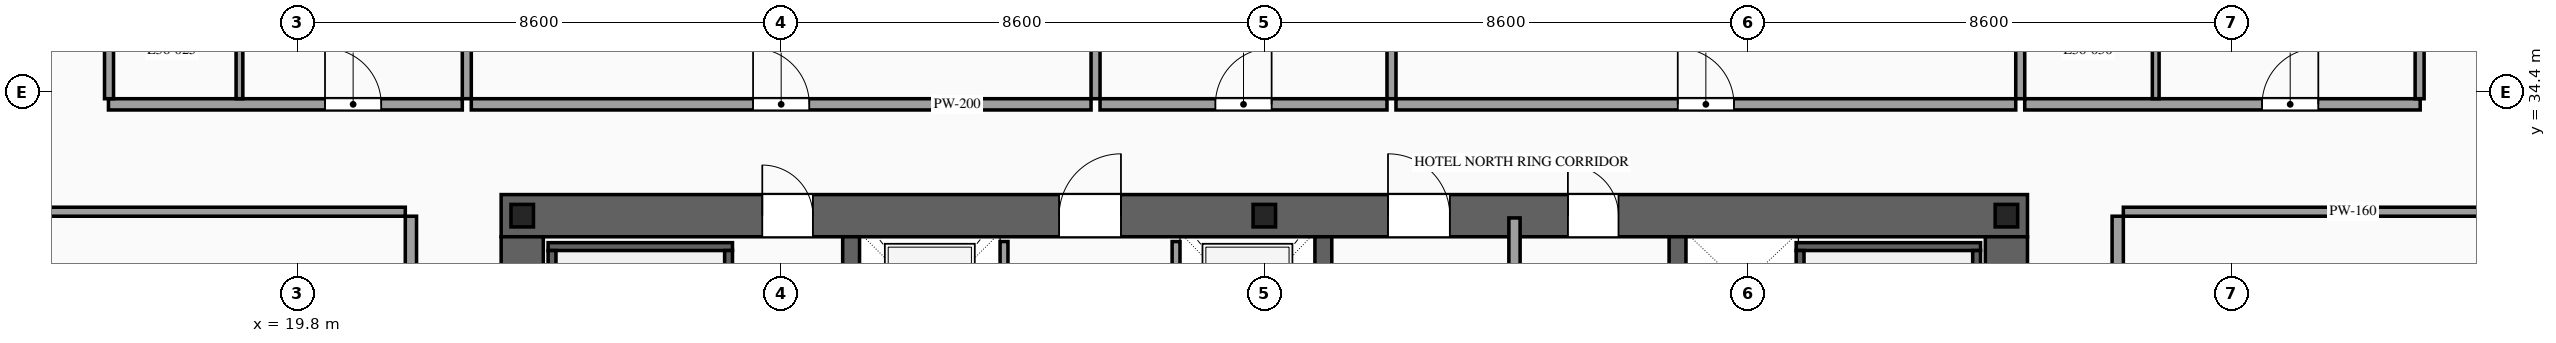
"""IFC4 building model, lengths in metres.
Left out: names, types, materials, properties, quantities, classifications, styles, units other than length and angle.
Written with IfcOpenShell. Run it as: python <this file> out.ifc"""

import sys

from ifc_helpers import new_model, si_unit, direction, frame, frame_2d, origin, origin_2d, place, context, subcontext, project, spatial, rectangle, i_section, extrude, source, transform, mapped, element, fill, save


model = new_model("IFC4")
c1 = context("Model", 3, precision=1e-05, world=origin(), true_north=direction((0.0, 1.0)))
c2 = subcontext(c1, "Body", "Model", "MODEL_VIEW")
j1 = project(units=[si_unit("LENGTHUNIT", "METRE"), si_unit("PLANEANGLEUNIT", "RADIAN")], contexts=[c1])
p1 = place(None, origin())
s1 = spatial("IfcSite", under=j1, at=p1, CompositionType="ELEMENT")
p2 = place(p1, origin())
s2 = spatial("IfcBuilding", under=s1, at=p2, CompositionType="ELEMENT")
p3 = place(p2, frame((0.0, 0.0, 138.0)))
s3 = spatial("IfcBuildingStorey", under=s2, at=p3, CompositionType="ELEMENT", Elevation=138.0)
p4 = place(p3, frame((23.425, 32.2, 0.0), z_axis=(0.0, 0.0, 1.0), x_axis=(1.0, 0.0, 0.0)))
e1 = element("IfcWall", 1, at=p4, inside=s3, PredefinedType="SHEAR", context=c2, shape_type="SweptSolid", body=[
    extrude(rectangle(XDim=27.15, YDim=0.75, at=frame_2d((13.575, 0.0))), origin(), (0.0, 0.0, 1.0), 3.6),
])
p5 = place(p4, frame((4.645, 0.0, 0.0)))
e2 = element("IfcOpeningElement", 2, at=p5, cuts=e1, PredefinedType="OPENING", context=c2, shape_type="SweptSolid", body=[
    extrude(rectangle(XDim=0.9, YDim=2.15, at=frame_2d((0.45, 1.075))), frame((0.0, 0.39, 0.0), z_axis=(0.0, -1.0, 0.0), x_axis=(1.0, 0.0, 0.0)), (0.0, 0.0, 1.0), 0.78),
])
p6 = place(p4, frame((9.925, 0.0, 0.0)))
e3 = element("IfcOpeningElement", 3, at=p6, cuts=e1, PredefinedType="OPENING", context=c2, shape_type="SweptSolid", body=[
    extrude(rectangle(XDim=1.1, YDim=2.2, at=frame_2d((0.55, 1.1))), frame((0.0, 0.39, 0.0), z_axis=(0.0, -1.0, 0.0), x_axis=(1.0, 0.0, 0.0)), (0.0, 0.0, 1.0), 0.78),
])
p7 = place(p4, frame((15.775, 0.0, 0.0)))
e4 = element("IfcOpeningElement", 4, at=p7, cuts=e1, PredefinedType="OPENING", context=c2, shape_type="SweptSolid", body=[
    extrude(rectangle(XDim=1.1, YDim=2.2, at=frame_2d((0.55, 1.1))), frame((0.0, 0.39, 0.0), z_axis=(0.0, -1.0, 0.0), x_axis=(1.0, 0.0, 0.0)), (0.0, 0.0, 1.0), 0.78),
])
p8 = place(p4, frame((18.975, 0.0, 0.0)))
e5 = element("IfcOpeningElement", 5, at=p8, cuts=e1, PredefinedType="OPENING", context=c2, shape_type="SweptSolid", body=[
    extrude(rectangle(XDim=0.9, YDim=2.15, at=frame_2d((0.45, 1.075))), frame((0.0, 0.39, 0.0), z_axis=(0.0, -1.0, 0.0), x_axis=(1.0, 0.0, 0.0)), (0.0, 0.0, 1.0), 0.78),
])
m1 = source(origin(), c2, "Body", "SweptSolid", [
    extrude(rectangle(XDim=12.05, YDim=0.75, at=frame_2d((6.025, 0.0))), origin(), (0.0, 0.0, 1.0), 3.6),
])
for number, where, z_axis, x_axis in (
    (6, (23.8, 19.775, 0.0), (0.0, 0.0, 1.0), (0.0, 1.0, 0.0)),
    (7, (50.2, 19.775, 0.0), (0.0, 0.0, 1.0), (0.0, 1.0, 0.0)),
):
    element("IfcWall", number, at=place(p3, frame(where, z_axis=z_axis, x_axis=x_axis)), inside=s3, PredefinedType="SHEAR", context=c2, shape_type="MappedRepresentation", body=[
        mapped(m1, transform((0.0, 0.0, 0.0), scale=1.0)),
    ])
m2 = source(origin(), c2, "Body", "SweptSolid", [
    extrude(rectangle(XDim=12.05, YDim=0.3, at=frame_2d((6.025, 0.0))), origin(), (0.0, 0.0, 1.0), 3.6),
])
for number, where, z_axis, x_axis in (
    (8, (29.65, 19.775, 0.0), (0.0, 0.0, 1.0), (0.0, 1.0, 0.0)),
    (9, (38.05, 19.775, 0.0), (0.0, 0.0, 1.0), (0.0, 1.0, 0.0)),
    (10, (44.35, 19.775, 0.0), (0.0, 0.0, 1.0), (0.0, 1.0, 0.0)),
):
    element("IfcWall", number, at=place(p3, frame(where, z_axis=z_axis, x_axis=x_axis)), inside=s3, PredefinedType="SOLIDWALL", context=c2, shape_type="MappedRepresentation", body=[
        mapped(m2, transform((0.0, 0.0, 0.0), scale=1.0)),
    ])
m3 = source(origin(), c2, "Body", "SweptSolid", [
    extrude(i_section(OverallWidth=0.4, OverallDepth=0.4, WebThickness=0.013, FlangeThickness=0.021, at=origin_2d()), origin(), (0.0, 0.0, 1.0), 3.6),
])
for number, where, z_axis, x_axis in (
    (11, (23.8, 32.2, 0.0), (0.0, 0.0, 1.0), (1.0, 0.0, 0.0)),
    (12, (37.0, 32.2, 0.0), (0.0, 0.0, 1.0), (1.0, 0.0, 0.0)),
    (13, (50.2, 32.2, 0.0), (0.0, 0.0, 1.0), (1.0, 0.0, 0.0)),
):
    element("IfcColumn", number, at=place(p3, frame(where, z_axis=z_axis, x_axis=x_axis)), inside=s3, PredefinedType="COLUMN", context=c2, shape_type="MappedRepresentation", body=[
        mapped(m3, transform((0.0, 0.0, 0.0), scale=1.0)),
    ])
p9 = place(p3, frame((32.37, 29.4, 0.0), z_axis=(0.0, 0.0, 1.0), x_axis=(0.0, 1.0, 0.0)))
e14 = element("IfcWall", 14, at=p9, inside=s3, PredefinedType="SOLIDWALL", context=c2, shape_type="SweptSolid", body=[
    extrude(rectangle(XDim=2.34, YDim=0.14, at=frame_2d((1.17, 0.0))), origin(), (0.0, 0.0, 1.0), 3.38),
])
p10 = place(p9, frame((0.62, 0.0, 0.0)))
e15 = element("IfcOpeningElement", 15, at=p10, cuts=e14, PredefinedType="OPENING", context=c2, shape_type="SweptSolid", body=[
    extrude(rectangle(XDim=1.1, YDim=2.2, at=frame_2d((0.55, 1.1))), frame((0.0, 0.085, 0.0), z_axis=(0.0, -1.0, 0.0), x_axis=(1.0, 0.0, 0.0)), (0.0, 0.0, 1.0), 0.17),
])
p11 = place(p3, frame((35.43, 29.4, 0.0), z_axis=(0.0, 0.0, 1.0), x_axis=(0.0, 1.0, 0.0)))
e16 = element("IfcWall", 16, at=p11, inside=s3, PredefinedType="SOLIDWALL", context=c2, shape_type="SweptSolid", body=[
    extrude(rectangle(XDim=2.34, YDim=0.14, at=frame_2d((1.17, 0.0))), origin(), (0.0, 0.0, 1.0), 3.38),
])
p12 = place(p11, frame((0.62, 0.0, 0.0)))
e17 = element("IfcOpeningElement", 17, at=p12, cuts=e16, PredefinedType="OPENING", context=c2, shape_type="SweptSolid", body=[
    extrude(rectangle(XDim=1.1, YDim=2.2, at=frame_2d((0.55, 1.1))), frame((0.0, 0.085, 0.0), z_axis=(0.0, -1.0, 0.0), x_axis=(1.0, 0.0, 0.0)), (0.0, 0.0, 1.0), 0.17),
])
m4 = source(origin(), c2, "Body", "SweptSolid", [
    extrude(rectangle(XDim=3.28, YDim=0.14, at=frame_2d((1.64, 0.0))), origin(), (0.0, 0.0, 1.0), 3.38),
])
p13 = place(p3, frame((24.26, 31.65, 0.0), z_axis=(0.0, 0.0, 1.0), x_axis=(1.0, 0.0, 0.0)))
e18 = element("IfcWall", 18, at=p13, inside=s3, PredefinedType="SOLIDWALL", context=c2, shape_type="MappedRepresentation", body=[
    mapped(m4, transform((0.0, 0.0, 0.0), scale=1.0)),
])
m5 = source(origin(), c2, "Body", "SweptSolid", [
    extrude(rectangle(XDim=8.94, YDim=0.14, at=frame_2d((4.47, 0.0))), origin(), (0.0, 0.0, 1.0), 3.38),
])
for number, where, z_axis, x_axis in (
    (19, (24.33, 22.64, 0.0), (0.0, 0.0, 1.0), (0.0, 1.0, 0.0)),
    (20, (27.47, 22.64, 0.0), (0.0, 0.0, 1.0), (0.0, 1.0, 0.0)),
):
    element("IfcWall", number, at=place(p3, frame(where, z_axis=z_axis, x_axis=x_axis)), inside=s3, PredefinedType="SOLIDWALL", context=c2, shape_type="MappedRepresentation", body=[
        mapped(m5, transform((0.0, 0.0, 0.0), scale=1.0)),
    ])
p14 = place(p3, frame((46.46, 31.65, 0.0), z_axis=(0.0, 0.0, 1.0), x_axis=(1.0, 0.0, 0.0)))
e21 = element("IfcWall", 21, at=p14, inside=s3, PredefinedType="SOLIDWALL", context=c2, shape_type="MappedRepresentation", body=[
    mapped(m4, transform((0.0, 0.0, 0.0), scale=1.0)),
])
for number, where, z_axis, x_axis in (
    (22, (46.53, 22.64, 0.0), (0.0, 0.0, 1.0), (0.0, 1.0, 0.0)),
    (23, (49.67, 22.64, 0.0), (0.0, 0.0, 1.0), (0.0, 1.0, 0.0)),
):
    element("IfcWall", number, at=place(p3, frame(where, z_axis=z_axis, x_axis=x_axis)), inside=s3, PredefinedType="SOLIDWALL", context=c2, shape_type="MappedRepresentation", body=[
        mapped(m5, transform((0.0, 0.0, 0.0), scale=1.0)),
    ])
m6 = source(origin(), c2, "Body", "SweptSolid", [
    extrude(rectangle(XDim=5.96, YDim=0.2, at=frame_2d((2.98, 0.0))), origin(), (0.0, 0.0, 1.0), 3.38),
])
p15 = place(p3, frame((41.45, 26.2, 0.0), z_axis=(0.0, 0.0, 1.0), x_axis=(0.0, 1.0, 0.0)))
e24 = element("IfcWall", 24, at=p15, inside=s3, PredefinedType="PARTITIONING", context=c2, shape_type="MappedRepresentation", body=[
    mapped(m6, transform((0.0, 0.0, 0.0), scale=1.0)),
])
p16 = place(p3, frame((16.44, 34.18, 0.0), z_axis=(0.0, 0.0, 1.0), x_axis=(1.0, 0.0, 0.0)))
e25 = element("IfcWall", 25, at=p16, inside=s3, PredefinedType="PARTITIONING", context=c2, shape_type="SweptSolid", body=[
    extrude(rectangle(XDim=6.294, YDim=0.2, at=frame_2d((3.147, 0.0))), origin(), (0.0, 0.0, 1.0), 3.38),
])
p17 = place(p16, frame((3.852, 0.0, 0.0)))
e26 = element("IfcOpeningElement", 26, at=p17, cuts=e25, PredefinedType="OPENING", context=c2, shape_type="SweptSolid", body=[
    extrude(rectangle(XDim=1.0, YDim=2.2, at=frame_2d((0.5, 1.1))), frame((0.0, 0.115, 0.0), z_axis=(0.0, -1.0, 0.0), x_axis=(1.0, 0.0, 0.0)), (0.0, 0.0, 1.0), 0.23),
])
m7 = source(origin(), c2, "Body", "SweptSolid", [
    extrude(rectangle(XDim=14.97, YDim=0.16, at=frame_2d((7.485, 0.0))), origin(), (0.0, 0.0, 1.0), 3.38),
])
p18 = place(p3, frame((22.814, 34.28, 0.0), z_axis=(0.0, 0.0, 1.0), x_axis=(0.0, 1.0, 0.0)))
e27 = element("IfcWall", 27, at=p18, inside=s3, PredefinedType="PARTITIONING", context=c2, shape_type="MappedRepresentation", body=[
    mapped(m7, transform((0.0, 0.0, 0.0), scale=1.0)),
])
m8 = source(origin(), c2, "Body", "SweptSolid", [
    extrude(rectangle(XDim=2.42, YDim=0.12, at=frame_2d((1.21, 0.0))), origin(), (0.0, 0.0, 1.0), 3.38),
])
p19 = place(p3, frame((18.77, 34.28, 0.0), z_axis=(0.0, 0.0, 1.0), x_axis=(0.0, 1.0, 0.0)))
e28 = element("IfcWall", 28, at=p19, inside=s3, PredefinedType="PARTITIONING", context=c2, shape_type="MappedRepresentation", body=[
    mapped(m8, transform((0.0, 0.0, 0.0), scale=1.0)),
])
p20 = place(p3, frame((22.894, 34.18, 0.0), z_axis=(0.0, 0.0, 1.0), x_axis=(1.0, 0.0, 0.0)))
e29 = element("IfcWall", 29, at=p20, inside=s3, PredefinedType="PARTITIONING", context=c2, shape_type="SweptSolid", body=[
    extrude(rectangle(XDim=11.024, YDim=0.2, at=frame_2d((5.512, 0.0))), origin(), (0.0, 0.0, 1.0), 3.38),
])
p21 = place(p20, frame((5.012, 0.0, 0.0)))
e30 = element("IfcOpeningElement", 30, at=p21, cuts=e29, PredefinedType="OPENING", context=c2, shape_type="SweptSolid", body=[
    extrude(rectangle(XDim=1.0, YDim=2.2, at=frame_2d((0.5, 1.1))), frame((0.0, 0.115, 0.0), z_axis=(0.0, -1.0, 0.0), x_axis=(1.0, 0.0, 0.0)), (0.0, 0.0, 1.0), 0.23),
])
p22 = place(p3, frame((33.998, 34.28, 0.0), z_axis=(0.0, 0.0, 1.0), x_axis=(0.0, 1.0, 0.0)))
e31 = element("IfcWall", 31, at=p22, inside=s3, PredefinedType="PARTITIONING", context=c2, shape_type="MappedRepresentation", body=[
    mapped(m7, transform((0.0, 0.0, 0.0), scale=1.0)),
])
p23 = place(p3, frame((34.078, 34.18, 0.0), z_axis=(0.0, 0.0, 1.0), x_axis=(1.0, 0.0, 0.0)))
e32 = element("IfcWall", 32, at=p23, inside=s3, PredefinedType="PARTITIONING", context=c2, shape_type="SweptSolid", body=[
    extrude(rectangle(XDim=5.104, YDim=0.2, at=frame_2d((2.552, 0.0))), origin(), (0.0, 0.0, 1.0), 3.38),
])
p24 = place(p23, frame((2.052, 0.0, 0.0)))
e33 = element("IfcOpeningElement", 33, at=p24, cuts=e32, PredefinedType="OPENING", context=c2, shape_type="SweptSolid", body=[
    extrude(rectangle(XDim=1.0, YDim=2.2, at=frame_2d((0.5, 1.1))), frame((0.0, 0.115, 0.0), z_axis=(0.0, -1.0, 0.0), x_axis=(1.0, 0.0, 0.0)), (0.0, 0.0, 1.0), 0.23),
])
p25 = place(p3, frame((39.262, 34.28, 0.0), z_axis=(0.0, 0.0, 1.0), x_axis=(0.0, 1.0, 0.0)))
e34 = element("IfcWall", 34, at=p25, inside=s3, PredefinedType="PARTITIONING", context=c2, shape_type="MappedRepresentation", body=[
    mapped(m7, transform((0.0, 0.0, 0.0), scale=1.0)),
])
p26 = place(p3, frame((39.342, 34.18, 0.0), z_axis=(0.0, 0.0, 1.0), x_axis=(1.0, 0.0, 0.0)))
e35 = element("IfcWall", 35, at=p26, inside=s3, PredefinedType="PARTITIONING", context=c2, shape_type="SweptSolid", body=[
    extrude(rectangle(XDim=11.024, YDim=0.2, at=frame_2d((5.512, 0.0))), origin(), (0.0, 0.0, 1.0), 3.38),
])
p27 = place(p26, frame((5.012, 0.0, 0.0)))
e36 = element("IfcOpeningElement", 36, at=p27, cuts=e35, PredefinedType="OPENING", context=c2, shape_type="SweptSolid", body=[
    extrude(rectangle(XDim=1.0, YDim=2.2, at=frame_2d((0.5, 1.1))), frame((0.0, 0.115, 0.0), z_axis=(0.0, -1.0, 0.0), x_axis=(1.0, 0.0, 0.0)), (0.0, 0.0, 1.0), 0.23),
])
p28 = place(p3, frame((50.446, 34.28, 0.0), z_axis=(0.0, 0.0, 1.0), x_axis=(0.0, 1.0, 0.0)))
e37 = element("IfcWall", 37, at=p28, inside=s3, PredefinedType="PARTITIONING", context=c2, shape_type="MappedRepresentation", body=[
    mapped(m7, transform((0.0, 0.0, 0.0), scale=1.0)),
])
p29 = place(p3, frame((50.526, 34.18, 0.0), z_axis=(0.0, 0.0, 1.0), x_axis=(1.0, 0.0, 0.0)))
e38 = element("IfcWall", 38, at=p29, inside=s3, PredefinedType="PARTITIONING", context=c2, shape_type="SweptSolid", body=[
    extrude(rectangle(XDim=7.034, YDim=0.2, at=frame_2d((3.517, 0.0))), origin(), (0.0, 0.0, 1.0), 3.38),
])
p30 = place(p29, frame((4.222, 0.0, 0.0)))
e39 = element("IfcOpeningElement", 39, at=p30, cuts=e38, PredefinedType="OPENING", context=c2, shape_type="SweptSolid", body=[
    extrude(rectangle(XDim=1.0, YDim=2.2, at=frame_2d((0.5, 1.1))), frame((0.0, 0.115, 0.0), z_axis=(0.0, -1.0, 0.0), x_axis=(1.0, 0.0, 0.0)), (0.0, 0.0, 1.0), 0.23),
])
m9 = source(origin(), c2, "Body", "SweptSolid", [
    extrude(rectangle(XDim=14.82, YDim=0.16, at=frame_2d((7.41, 0.0))), origin(), (0.0, 0.0, 1.0), 3.38),
])
for number, where, z_axis, x_axis in (
    (40, (16.45, 34.28, 0.0), (0.0, 0.0, 1.0), (0.0, 1.0, 0.0)),
    (41, (57.55, 34.28, 0.0), (0.0, 0.0, 1.0), (0.0, 1.0, 0.0)),
):
    element("IfcWall", number, at=place(p3, frame(where, z_axis=z_axis, x_axis=x_axis)), inside=s3, PredefinedType="PARTITIONING", context=c2, shape_type="MappedRepresentation", body=[
        mapped(m9, transform((0.0, 0.0, 0.0), scale=1.0)),
    ])
p31 = place(p3, frame((52.856, 34.28, 0.0), z_axis=(0.0, 0.0, 1.0), x_axis=(0.0, 1.0, 0.0)))
e42 = element("IfcWall", 42, at=p31, inside=s3, PredefinedType="PARTITIONING", context=c2, shape_type="MappedRepresentation", body=[
    mapped(m8, transform((0.0, 0.0, 0.0), scale=1.0)),
])
p32 = place(p3, frame((21.82, 25.88, 0.0), z_axis=(0.0, 0.0, 1.0), x_axis=(0.0, 1.0, 0.0)))
e43 = element("IfcWall", 43, at=p32, inside=s3, PredefinedType="PARTITIONING", context=c2, shape_type="SweptSolid", body=[
    extrude(rectangle(XDim=6.31, YDim=0.2, at=frame_2d((3.155, 0.0))), origin(), (0.0, 0.0, 1.0), 3.38),
])
p33 = place(p32, frame((3.835, 0.0, 0.0)))
e44 = element("IfcOpeningElement", 44, at=p33, cuts=e43, PredefinedType="OPENING", context=c2, shape_type="SweptSolid", body=[
    extrude(rectangle(XDim=1.0, YDim=2.2, at=frame_2d((0.5, 1.1))), frame((0.0, 0.115, 0.0), z_axis=(0.0, -1.0, 0.0), x_axis=(1.0, 0.0, 0.0)), (0.0, 0.0, 1.0), 0.23),
])
m10 = source(origin(), c2, "Body", "SweptSolid", [
    extrude(rectangle(XDim=8.17, YDim=0.16, at=frame_2d((4.085, 0.0))), origin(), (0.0, 0.0, 1.0), 2.875),
])
p34 = place(p3, frame((13.55, 32.27, 0.0), z_axis=(0.0, 0.0, 1.0), x_axis=(1.0, 0.0, 0.0)))
e45 = element("IfcWall", 45, at=p34, inside=s3, PredefinedType="PARTITIONING", context=c2, shape_type="MappedRepresentation", body=[
    mapped(m10, transform((0.0, 0.0, 0.0), scale=1.0)),
])
p35 = place(p3, frame((52.18, 25.88, 0.0), z_axis=(0.0, 0.0, 1.0), x_axis=(0.0, 1.0, 0.0)))
e46 = element("IfcWall", 46, at=p35, inside=s3, PredefinedType="PARTITIONING", context=c2, shape_type="SweptSolid", body=[
    extrude(rectangle(XDim=6.31, YDim=0.2, at=frame_2d((3.155, 0.0))), origin(), (0.0, 0.0, 1.0), 3.38),
])
p36 = place(p35, frame((3.835, 0.0, 0.0)))
e47 = element("IfcOpeningElement", 47, at=p36, cuts=e46, PredefinedType="OPENING", context=c2, shape_type="SweptSolid", body=[
    extrude(rectangle(XDim=1.0, YDim=2.2, at=frame_2d((0.5, 1.1))), frame((0.0, 0.115, 0.0), z_axis=(0.0, -1.0, 0.0), x_axis=(1.0, 0.0, 0.0)), (0.0, 0.0, 1.0), 0.23),
])
p37 = place(p3, frame((52.28, 32.27, 0.0), z_axis=(0.0, 0.0, 1.0), x_axis=(1.0, 0.0, 0.0)))
e48 = element("IfcWall", 48, at=p37, inside=s3, PredefinedType="PARTITIONING", context=c2, shape_type="MappedRepresentation", body=[
    mapped(m10, transform((0.0, 0.0, 0.0), scale=1.0)),
])
m11 = source(origin(), c2, "Body", "SweptSolid", [
    extrude(rectangle(XDim=0.9, YDim=2.15, at=frame_2d((0.45, 1.075))), frame((0.0, 0.025, 0.0), z_axis=(0.0, -1.0, 0.0), x_axis=(1.0, 0.0, 0.0)), (0.0, 0.0, 1.0), 0.05),
])
p38 = place(p5, origin())
e49 = element("IfcDoor", 49, at=p38, inside=s3, OperationType="SINGLE_SWING_LEFT", PredefinedType="DOOR", context=c2, shape_type="MappedRepresentation", body=[
    mapped(m11, transform((0.0, 0.0, 0.0), scale=1.0)),
])
fill(e2, e49)
m12 = source(origin(), c2, "Body", "SweptSolid", [
    extrude(rectangle(XDim=1.1, YDim=2.2, at=frame_2d((0.55, 1.1))), frame((0.0, 0.025, 0.0), z_axis=(0.0, -1.0, 0.0), x_axis=(1.0, 0.0, 0.0)), (0.0, 0.0, 1.0), 0.05),
])
p39 = place(p6, origin())
e50 = element("IfcDoor", 50, at=p39, inside=s3, OperationType="SINGLE_SWING_RIGHT", PredefinedType="DOOR", context=c2, shape_type="MappedRepresentation", body=[
    mapped(m12, transform((0.0, 0.0, 0.0), scale=1.0)),
])
fill(e3, e50)
p40 = place(p7, origin())
e51 = element("IfcDoor", 51, at=p40, inside=s3, OperationType="SINGLE_SWING_LEFT", PredefinedType="DOOR", context=c2, shape_type="MappedRepresentation", body=[
    mapped(m12, transform((0.0, 0.0, 0.0), scale=1.0)),
])
fill(e4, e51)
p41 = place(p8, origin())
e52 = element("IfcDoor", 52, at=p41, inside=s3, OperationType="SINGLE_SWING_LEFT", PredefinedType="DOOR", context=c2, shape_type="MappedRepresentation", body=[
    mapped(m11, transform((0.0, 0.0, 0.0), scale=1.0)),
])
fill(e5, e52)
m13 = source(origin(), c2, "Body", "SweptSolid", [
    extrude(rectangle(XDim=1.0, YDim=2.2, at=frame_2d((0.5, 1.1))), frame((0.0, 0.025, 0.0), z_axis=(0.0, -1.0, 0.0), x_axis=(1.0, 0.0, 0.0)), (0.0, 0.0, 1.0), 0.05),
])
p42 = place(p17, origin())
e53 = element("IfcDoor", 53, at=p42, inside=s3, OperationType="SINGLE_SWING_LEFT", PredefinedType="DOOR", context=c2, shape_type="MappedRepresentation", body=[
    mapped(m13, transform((0.0, 0.0, 0.0), scale=1.0)),
])
fill(e26, e53)
p43 = place(p21, origin())
e54 = element("IfcDoor", 54, at=p43, inside=s3, OperationType="SINGLE_SWING_LEFT", PredefinedType="DOOR", context=c2, shape_type="MappedRepresentation", body=[
    mapped(m13, transform((0.0, 0.0, 0.0), scale=1.0)),
])
fill(e30, e54)
p44 = place(p24, origin())
e55 = element("IfcDoor", 55, at=p44, inside=s3, OperationType="SINGLE_SWING_RIGHT", PredefinedType="DOOR", context=c2, shape_type="MappedRepresentation", body=[
    mapped(m13, transform((0.0, 0.0, 0.0), scale=1.0)),
])
fill(e33, e55)
p45 = place(p27, origin())
e56 = element("IfcDoor", 56, at=p45, inside=s3, OperationType="SINGLE_SWING_LEFT", PredefinedType="DOOR", context=c2, shape_type="MappedRepresentation", body=[
    mapped(m13, transform((0.0, 0.0, 0.0), scale=1.0)),
])
fill(e36, e56)
p46 = place(p30, origin())
e57 = element("IfcDoor", 57, at=p46, inside=s3, OperationType="SINGLE_SWING_RIGHT", PredefinedType="DOOR", context=c2, shape_type="MappedRepresentation", body=[
    mapped(m13, transform((0.0, 0.0, 0.0), scale=1.0)),
])
fill(e39, e57)
save(model, sys.argv[1])
